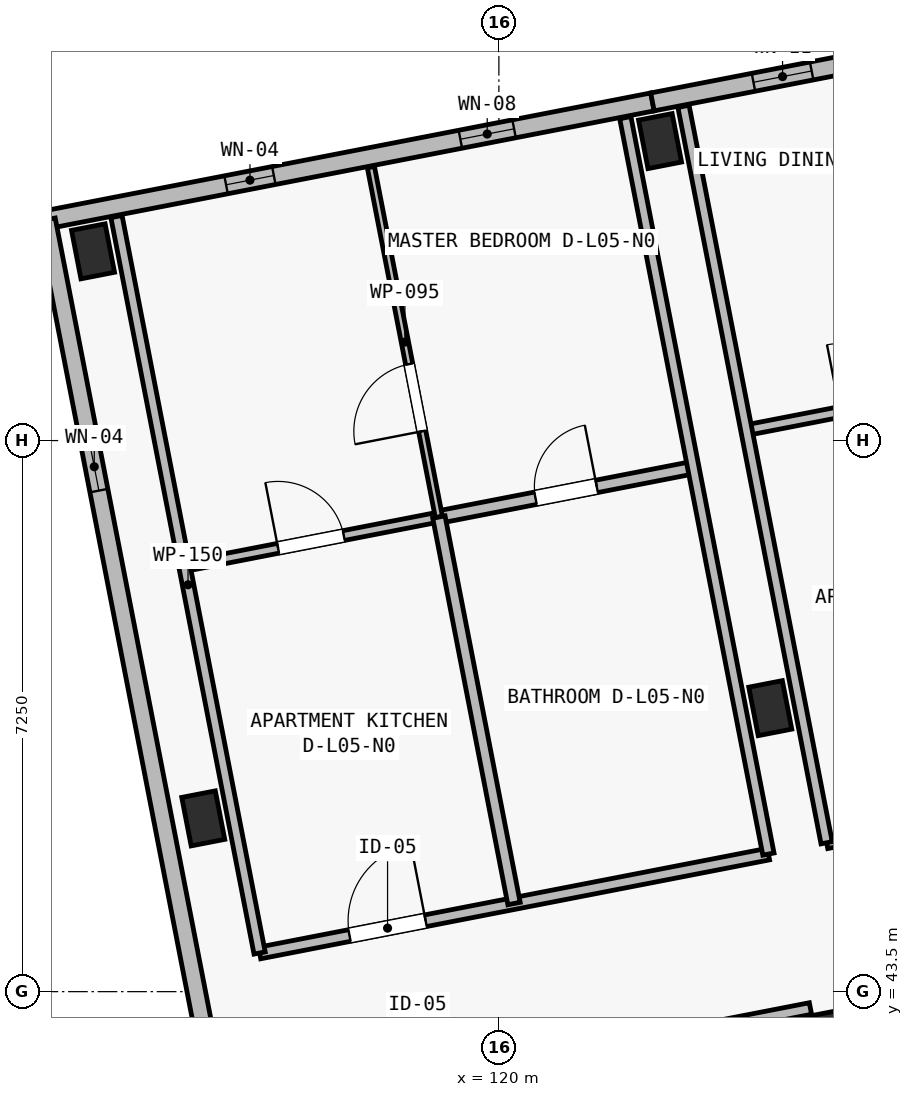
"""IFC4 building model, lengths in metres.
Left out: names, types, materials, properties, quantities, classifications, styles, units other than length and angle.
Written with IfcOpenShell. Run it as: python <this file> out.ifc"""

import sys

from ifc_helpers import new_model, si_unit, direction, frame, frame_2d, origin, origin_2d, place, context, subcontext, project, spatial, rectangle, extrude, element, fill, save


model = new_model("IFC4")
c1 = context("Model", 3, precision=1e-05, world=origin(), true_north=direction((0.0, 1.0)))
c2 = subcontext(c1, "Body", "Model", "MODEL_VIEW")
j1 = project(units=[si_unit("LENGTHUNIT", "METRE"), si_unit("PLANEANGLEUNIT", "RADIAN")], contexts=[c1])
p1 = place(None, origin())
s1 = spatial("IfcSite", under=j1, at=p1, CompositionType="ELEMENT")
p2 = place(p1, origin())
s2 = spatial("IfcBuilding", under=s1, at=p2, CompositionType="ELEMENT")
p3 = place(p2, frame((0.0, 0.0, 18.15)))
s3 = spatial("IfcBuildingStorey", under=s2, at=p3, CompositionType="ELEMENT", Elevation=18.15)
for number, where, z_axis, x_axis in (
    (1, (116.11, 45.78, 0.0), (0.0, 0.0, 1.0), (0.982, 0.191, 0.0)),
    (2, (114.66, 53.24, 0.0), (0.0, 0.0, 1.0), (0.982, 0.191, 0.0)),
    (3, (124.41, 42.91, 0.0), (0.0, 0.0, 1.0), (0.982, 0.191, 0.0)),
    (4, (123.571, 47.23, 0.0), (0.0, 0.0, 1.0), (0.982, 0.191, 0.0)),
    (5, (122.121, 54.69, 0.0), (0.0, 0.0, 1.0), (0.982, 0.191, 0.0)),
):
    element("IfcColumn", number, at=place(p3, frame(where, z_axis=z_axis, x_axis=x_axis)), inside=s3, PredefinedType="COLUMN", context=c2, shape_type="SweptSolid", body=[
        extrude(rectangle(XDim=0.45, YDim=0.65, at=origin_2d()), origin(), (0.0, 0.0, 1.0), 3.25),
    ])
p4 = place(p3, frame((114.045, 53.655, 0.0), z_axis=(0.0, 0.0, 1.0), x_axis=(0.981627273155, 0.190808533872, 0.0)))
e6 = element("IfcWall", 6, at=p4, inside=s3, PredefinedType="SOLIDWALL", context=c2, shape_type="SweptSolid", body=[
    extrude(rectangle(XDim=8.125, YDim=0.24, at=frame_2d((4.062, 0.0))), origin(), (0.0, 0.0, 1.0), 3.0),
])
p5 = place(p4, frame((2.41, 0.0, 0.5)))
e7 = element("IfcOpeningElement", 7, at=p5, cuts=e6, PredefinedType="OPENING", context=c2, shape_type="SweptSolid", body=[
    extrude(rectangle(XDim=0.64, YDim=2.18, at=frame_2d((0.32, 1.09))), frame((0.0, 0.135, 0.0), z_axis=(0.0, -1.0, 0.0), x_axis=(1.0, 0.0, 0.0)), (0.0, 0.0, 1.0), 0.27),
])
p6 = place(p4, frame((5.551, 0.0, 0.44)))
e8 = element("IfcOpeningElement", 8, at=p6, cuts=e6, PredefinedType="OPENING", context=c2, shape_type="SweptSolid", body=[
    extrude(rectangle(XDim=0.72, YDim=2.16, at=frame_2d((0.36, 1.08))), frame((0.0, 0.135, 0.0), z_axis=(0.0, -1.0, 0.0), x_axis=(1.0, 0.0, 0.0)), (0.0, 0.0, 1.0), 0.27),
])
p7 = place(p3, frame((122.02, 55.205, 0.0), z_axis=(0.0, 0.0, 1.0), x_axis=(0.981626422232, 0.190812911449, 0.0)))
e9 = element("IfcWall", 9, at=p7, inside=s3, PredefinedType="SOLIDWALL", context=c2, shape_type="SweptSolid", body=[
    extrude(rectangle(XDim=7.6, YDim=0.24, at=frame_2d((3.8, 0.0))), origin(), (0.0, 0.0, 1.0), 3.0),
])
p8 = place(p7, frame((1.354, 0.0, 0.44)))
e10 = element("IfcOpeningElement", 10, at=p8, cuts=e9, PredefinedType="OPENING", context=c2, shape_type="SweptSolid", body=[
    extrude(rectangle(XDim=0.78, YDim=2.2, at=frame_2d((0.39, 1.1))), frame((0.0, 0.135, 0.0), z_axis=(0.0, -1.0, 0.0), x_axis=(1.0, 0.0, 0.0)), (0.0, 0.0, 1.0), 0.27),
])
p9 = place(p7, frame((5.826, 0.0, 0.5)))
e11 = element("IfcOpeningElement", 11, at=p9, cuts=e9, PredefinedType="OPENING", context=c2, shape_type="SweptSolid", body=[
    extrude(rectangle(XDim=0.86, YDim=2.36, at=frame_2d((0.43, 1.18))), frame((0.0, 0.135, 0.0), z_axis=(0.0, -1.0, 0.0), x_axis=(1.0, 0.0, 0.0)), (0.0, 0.0, 1.0), 0.27),
])
p10 = place(p3, frame((117.985, 33.385, 0.0), z_axis=(0.0, 0.0, 1.0), x_axis=(-0.190808900739, 0.981627201843, 0.0)))
e12 = element("IfcWall", 12, at=p10, inside=s3, PredefinedType="SOLIDWALL", context=c2, shape_type="SweptSolid", body=[
    extrude(rectangle(XDim=20.65, YDim=0.24, at=frame_2d((10.325, 0.0))), origin(), (0.0, 0.0, 1.0), 3.0),
])
p11 = place(p10, frame((2.63, 0.0, 0.52)))
e13 = element("IfcOpeningElement", 13, at=p11, cuts=e12, PredefinedType="OPENING", context=c2, shape_type="SweptSolid", body=[
    extrude(rectangle(XDim=0.8, YDim=2.3, at=frame_2d((0.4, 1.15))), frame((0.0, 0.135, 0.0), z_axis=(0.0, -1.0, 0.0), x_axis=(1.0, 0.0, 0.0)), (0.0, 0.0, 1.0), 0.27),
])
p12 = place(p10, frame((17.02, 0.0, 0.45)))
e14 = element("IfcOpeningElement", 14, at=p12, cuts=e12, PredefinedType="OPENING", context=c2, shape_type="SweptSolid", body=[
    extrude(rectangle(XDim=0.64, YDim=2.18, at=frame_2d((0.32, 1.09))), frame((0.0, 0.135, 0.0), z_axis=(0.0, -1.0, 0.0), x_axis=(1.0, 0.0, 0.0)), (0.0, 0.0, 1.0), 0.27),
])
p13 = place(p3, frame((116.482, 41.797, 0.0), z_axis=(0.0, 0.0, 1.0), x_axis=(0.981626358594, 0.190813238834, 0.0)))
e15 = element("IfcWall", 15, at=p13, inside=s3, PredefinedType="PARTITIONING", context=c2, shape_type="SweptSolid", body=[
    extrude(rectangle(XDim=7.76, YDim=0.155, at=frame_2d((3.88, 0.0))), origin(), (0.0, 0.0, 1.0), 2.97),
])
p14 = place(p13, frame((1.985, 0.0, 0.0)))
e16 = element("IfcOpeningElement", 16, at=p14, cuts=e15, PredefinedType="OPENING", context=c2, shape_type="SweptSolid", body=[
    extrude(rectangle(XDim=1.02, YDim=2.2, at=frame_2d((0.51, 1.1))), frame((0.0, 0.093, 0.0), z_axis=(0.0, -1.0, 0.0), x_axis=(1.0, 0.0, 0.0)), (0.0, 0.0, 1.0), 0.185),
])
p15 = place(p3, frame((116.852, 44.009, 0.0), z_axis=(0.0, 0.0, 1.0), x_axis=(0.981629173664, 0.190798756314, 0.0)))
e17 = element("IfcWall", 17, at=p15, inside=s3, PredefinedType="PARTITIONING", context=c2, shape_type="SweptSolid", body=[
    extrude(rectangle(XDim=6.82, YDim=0.155, at=frame_2d((3.41, 0.0))), origin(), (0.0, 0.0, 1.0), 2.97),
])
p16 = place(p15, frame((1.205, 0.0, 0.0)))
e18 = element("IfcOpeningElement", 18, at=p16, cuts=e17, PredefinedType="OPENING", context=c2, shape_type="SweptSolid", body=[
    extrude(rectangle(XDim=1.02, YDim=2.2, at=frame_2d((0.51, 1.1))), frame((0.0, 0.093, 0.0), z_axis=(0.0, -1.0, 0.0), x_axis=(1.0, 0.0, 0.0)), (0.0, 0.0, 1.0), 0.185),
])
p17 = place(p3, frame((115.864, 49.093, 0.0), z_axis=(0.0, 0.0, 1.0), x_axis=(0.98162656706, 0.190812166391, 0.0)))
e19 = element("IfcWall", 19, at=p17, inside=s3, PredefinedType="PARTITIONING", context=c2, shape_type="SweptSolid", body=[
    extrude(rectangle(XDim=3.41, YDim=0.13, at=frame_2d((1.705, 0.0))), origin(), (0.0, 0.0, 1.0), 2.97),
])
p18 = place(p17, frame((1.255, 0.0, 0.0)))
e20 = element("IfcOpeningElement", 20, at=p18, cuts=e19, PredefinedType="OPENING", context=c2, shape_type="SweptSolid", body=[
    extrude(rectangle(XDim=0.88, YDim=2.1, at=frame_2d((0.44, 1.05))), frame((0.0, 0.08, 0.0), z_axis=(0.0, -1.0, 0.0), x_axis=(1.0, 0.0, 0.0)), (0.0, 0.0, 1.0), 0.16),
])
p19 = place(p3, frame((119.211, 49.744, 0.0), z_axis=(0.0, 0.0, 1.0), x_axis=(0.981629173664, 0.190798756314, 0.0)))
e21 = element("IfcWall", 21, at=p19, inside=s3, PredefinedType="PLUMBINGWALL", context=c2, shape_type="SweptSolid", body=[
    extrude(rectangle(XDim=3.41, YDim=0.165, at=frame_2d((1.705, 0.0))), origin(), (0.0, 0.0, 1.0), 2.97),
])
p20 = place(p19, frame((1.295, 0.0, 0.0)))
e22 = element("IfcOpeningElement", 22, at=p20, cuts=e21, PredefinedType="OPENING", context=c2, shape_type="SweptSolid", body=[
    extrude(rectangle(XDim=0.82, YDim=2.08, at=frame_2d((0.41, 1.04))), frame((0.0, 0.097, 0.0), z_axis=(0.0, -1.0, 0.0), x_axis=(1.0, 0.0, 0.0)), (0.0, 0.0, 1.0), 0.195),
])
p21 = place(p3, frame((119.211, 49.744, 0.0), z_axis=(0.0, 0.0, 1.0), x_axis=(-0.190777702748, 0.981633265601, 0.0)))
e23 = element("IfcWall", 23, at=p21, inside=s3, PredefinedType="PARTITIONING", context=c2, shape_type="SweptSolid", body=[
    extrude(rectangle(XDim=4.69, YDim=0.095, at=frame_2d((2.345, 0.0))), origin(), (0.0, 0.0, 1.0), 2.97),
])
p22 = place(p21, frame((1.15, 0.0, 0.0)))
e24 = element("IfcOpeningElement", 24, at=p22, cuts=e23, PredefinedType="OPENING", context=c2, shape_type="SweptSolid", body=[
    extrude(rectangle(XDim=0.9, YDim=2.1, at=frame_2d((0.45, 1.05))), frame((0.0, 0.062, 0.0), z_axis=(0.0, -1.0, 0.0), x_axis=(1.0, 0.0, 0.0)), (0.0, 0.0, 1.0), 0.125),
])
p23 = place(p3, frame((120.199, 44.659, 0.0), z_axis=(0.0, 0.0, 1.0), x_axis=(-0.190838120755, 0.981621521599, 0.0)))
e25 = element("IfcWall", 25, at=p23, inside=s3, PredefinedType="PLUMBINGWALL", context=c2, shape_type="SweptSolid", body=[
    extrude(rectangle(XDim=5.18, YDim=0.165, at=frame_2d((2.59, 0.0))), origin(), (0.0, 0.0, 1.0), 2.97),
])
p24 = place(p3, frame((116.852, 44.009, 0.0), z_axis=(0.0, 0.0, 1.0), x_axis=(-0.190814044018, 0.981626202078, 0.0)))
e26 = element("IfcWall", 26, at=p24, inside=s3, PredefinedType="PARTITIONING", context=c2, shape_type="SweptSolid", body=[
    extrude(rectangle(XDim=9.87, YDim=0.15, at=frame_2d((4.935, 0.0))), origin(), (0.0, 0.0, 1.0), 2.97),
])
p25 = place(p3, frame((123.547, 45.31, 0.0), z_axis=(0.0, 0.0, 1.0), x_axis=(-0.190809410863, 0.981627102685, 0.0)))
e27 = element("IfcWall", 27, at=p25, inside=s3, PredefinedType="PARTITIONING", context=c2, shape_type="SweptSolid", body=[
    extrude(rectangle(XDim=9.87, YDim=0.15, at=frame_2d((4.935, 0.0))), origin(), (0.0, 0.0, 1.0), 2.97),
])
p26 = place(p3, frame((124.312, 45.459, 0.0), z_axis=(0.0, 0.0, 1.0), x_axis=(0.981627870431, 0.190805461121, 0.0)))
e28 = element("IfcWall", 28, at=p26, inside=s3, PredefinedType="PARTITIONING", context=c2, shape_type="SweptSolid", body=[
    extrude(rectangle(XDim=6.82, YDim=0.155, at=frame_2d((3.41, 0.0))), origin(), (0.0, 0.0, 1.0), 2.97),
])
p27 = place(p26, frame((1.205, 0.0, 0.0)))
e29 = element("IfcOpeningElement", 29, at=p27, cuts=e28, PredefinedType="OPENING", context=c2, shape_type="SweptSolid", body=[
    extrude(rectangle(XDim=0.98, YDim=2.15, at=frame_2d((0.49, 1.075))), frame((0.0, 0.093, 0.0), z_axis=(0.0, -1.0, 0.0), x_axis=(1.0, 0.0, 0.0)), (0.0, 0.0, 1.0), 0.185),
])
p28 = place(p3, frame((123.257, 50.887, 0.0), z_axis=(0.0, 0.0, 1.0), x_axis=(0.981629173664, 0.190798756314, 0.0)))
e30 = element("IfcWall", 30, at=p28, inside=s3, PredefinedType="PARTITIONING", context=c2, shape_type="SweptSolid", body=[
    extrude(rectangle(XDim=3.41, YDim=0.14, at=frame_2d((1.705, 0.0))), origin(), (0.0, 0.0, 1.0), 2.97),
])
p29 = place(p28, frame((1.255, 0.0, 0.0)))
e31 = element("IfcOpeningElement", 31, at=p29, cuts=e30, PredefinedType="OPENING", context=c2, shape_type="SweptSolid", body=[
    extrude(rectangle(XDim=0.9, YDim=2.1, at=frame_2d((0.45, 1.05))), frame((0.0, 0.085, 0.0), z_axis=(0.0, -1.0, 0.0), x_axis=(1.0, 0.0, 0.0)), (0.0, 0.0, 1.0), 0.17),
])
p30 = place(p3, frame((124.312, 45.459, 0.0), z_axis=(0.0, 0.0, 1.0), x_axis=(-0.190814044018, 0.981626202078, 0.0)))
e32 = element("IfcWall", 32, at=p30, inside=s3, PredefinedType="PARTITIONING", context=c2, shape_type="SweptSolid", body=[
    extrude(rectangle(XDim=9.87, YDim=0.15, at=frame_2d((4.935, 0.0))), origin(), (0.0, 0.0, 1.0), 2.97),
])
p31 = place(p5, origin())
e33 = element("IfcWindow", 33, at=p31, inside=s3, PartitioningType="SINGLE_PANEL", PredefinedType="WINDOW", context=c2, shape_type="SweptSolid", body=[
    extrude(rectangle(XDim=0.64, YDim=2.18, at=frame_2d((0.32, 1.09))), frame((0.0, 0.03, 0.0), z_axis=(0.0, -1.0, 0.0), x_axis=(1.0, 0.0, 0.0)), (0.0, 0.0, 1.0), 0.06),
])
fill(e7, e33)
p32 = place(p6, origin())
e34 = element("IfcWindow", 34, at=p32, inside=s3, PartitioningType="SINGLE_PANEL", PredefinedType="WINDOW", context=c2, shape_type="SweptSolid", body=[
    extrude(rectangle(XDim=0.72, YDim=2.16, at=frame_2d((0.36, 1.08))), frame((0.0, 0.03, 0.0), z_axis=(0.0, -1.0, 0.0), x_axis=(1.0, 0.0, 0.0)), (0.0, 0.0, 1.0), 0.06),
])
fill(e8, e34)
p33 = place(p8, origin())
e35 = element("IfcWindow", 35, at=p33, inside=s3, PartitioningType="SINGLE_PANEL", PredefinedType="WINDOW", context=c2, shape_type="SweptSolid", body=[
    extrude(rectangle(XDim=0.78, YDim=2.2, at=frame_2d((0.39, 1.1))), frame((0.0, 0.03, 0.0), z_axis=(0.0, -1.0, 0.0), x_axis=(1.0, 0.0, 0.0)), (0.0, 0.0, 1.0), 0.06),
])
fill(e10, e35)
p34 = place(p12, origin())
e36 = element("IfcWindow", 36, at=p34, inside=s3, PartitioningType="SINGLE_PANEL", PredefinedType="WINDOW", context=c2, shape_type="SweptSolid", body=[
    extrude(rectangle(XDim=0.64, YDim=2.18, at=frame_2d((0.32, 1.09))), frame((0.0, 0.03, 0.0), z_axis=(0.0, -1.0, 0.0), x_axis=(1.0, 0.0, 0.0)), (0.0, 0.0, 1.0), 0.06),
])
fill(e14, e36)
p35 = place(p16, origin())
e37 = element("IfcDoor", 37, at=p35, inside=s3, OperationType="SINGLE_SWING_RIGHT", PredefinedType="DOOR", context=c2, shape_type="SweptSolid", body=[
    extrude(rectangle(XDim=1.02, YDim=2.2, at=frame_2d((0.51, 1.1))), frame((0.0, 0.025, 0.0), z_axis=(0.0, -1.0, 0.0), x_axis=(1.0, 0.0, 0.0)), (0.0, 0.0, 1.0), 0.05),
])
fill(e18, e37)
p36 = place(p18, origin())
e38 = element("IfcDoor", 38, at=p36, inside=s3, OperationType="SINGLE_SWING_LEFT", PredefinedType="DOOR", context=c2, shape_type="SweptSolid", body=[
    extrude(rectangle(XDim=0.88, YDim=2.1, at=frame_2d((0.44, 1.05))), frame((0.0, 0.025, 0.0), z_axis=(0.0, -1.0, 0.0), x_axis=(1.0, 0.0, 0.0)), (0.0, 0.0, 1.0), 0.05),
])
fill(e20, e38)
p37 = place(p20, origin())
e39 = element("IfcDoor", 39, at=p37, inside=s3, OperationType="SINGLE_SWING_RIGHT", PredefinedType="DOOR", context=c2, shape_type="SweptSolid", body=[
    extrude(rectangle(XDim=0.82, YDim=2.08, at=frame_2d((0.41, 1.04))), frame((0.0, 0.025, 0.0), z_axis=(0.0, -1.0, 0.0), x_axis=(1.0, 0.0, 0.0)), (0.0, 0.0, 1.0), 0.05),
])
fill(e22, e39)
p38 = place(p22, origin())
e40 = element("IfcDoor", 40, at=p38, inside=s3, OperationType="SINGLE_SWING_LEFT", PredefinedType="DOOR", context=c2, shape_type="SweptSolid", body=[
    extrude(rectangle(XDim=0.9, YDim=2.1, at=frame_2d((0.45, 1.05))), frame((0.0, 0.025, 0.0), z_axis=(0.0, -1.0, 0.0), x_axis=(1.0, 0.0, 0.0)), (0.0, 0.0, 1.0), 0.05),
])
fill(e24, e40)
save(model, sys.argv[1])
